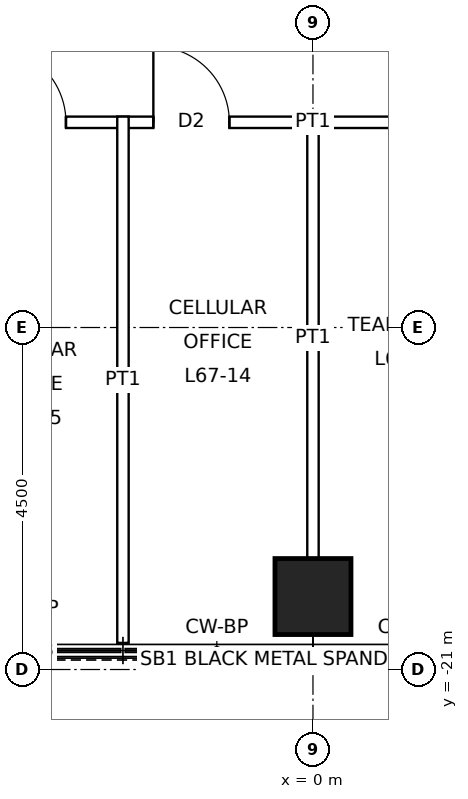
"""IFC4 building model, lengths in metres.
Left out: names, types, materials, properties, quantities, classifications, styles, units other than length and angle.
Written with IfcOpenShell. Run it as: python <this file> out.ifc"""

import sys

from ifc_helpers import new_model, si_unit, direction, frame, frame_2d, origin, origin_2d, place, context, subcontext, project, spatial, rectangle, hollow_rectangle, extrude, element, fill, save


model = new_model("IFC4")
c1 = context("Model", 3, precision=1e-05, world=origin(), true_north=direction((0.0, 1.0)))
c2 = subcontext(c1, "Body", "Model", "MODEL_VIEW")
j1 = project(units=[si_unit("LENGTHUNIT", "METRE"), si_unit("PLANEANGLEUNIT", "RADIAN")], contexts=[c1])
p1 = place(None, origin())
s1 = spatial("IfcSite", under=j1, at=p1, CompositionType="ELEMENT")
p2 = place(p1, origin())
s2 = spatial("IfcBuilding", under=s1, at=p2, CompositionType="ELEMENT")
p3 = place(p2, frame((0.0, 0.0, 303.9)))
s3 = spatial("IfcBuildingStorey", under=s2, at=p3, CompositionType="ELEMENT", Elevation=303.9)
p4 = place(p3, frame((0.0, -20.04, 0.0), z_axis=(0.0, 0.0, 1.0), x_axis=(1.0, 0.0, 0.0)))
e1 = element("IfcColumn", 1, at=p4, inside=s3, PredefinedType="COLUMN", context=c2, shape_type="SweptSolid", body=[
    extrude(hollow_rectangle(XDim=1.0, YDim=1.0, WallThickness=0.075, at=origin_2d()), origin(), (0.0, 0.0, 1.0), 4.0),
])
p5 = place(p3, frame((-13.875, -13.8, 0.0), z_axis=(0.0, 0.0, 1.0), x_axis=(1.0, 0.0, 0.0)))
e2 = element("IfcWall", 2, at=p5, inside=s3, PredefinedType="PARTITIONING", context=c2, shape_type="SweptSolid", body=[
    extrude(rectangle(XDim=27.75, YDim=0.15, at=frame_2d((13.875, 0.0))), origin(), (0.0, 0.0, 1.0), 3.85),
])
p6 = place(p5, frame((21.775, 0.0, 0.0)))
e3 = element("IfcOpeningElement", 3, at=p6, cuts=e2, PredefinedType="OPENING", context=c2, shape_type="SweptSolid", body=[
    extrude(rectangle(XDim=1.0, YDim=2.1, at=frame_2d((0.5, 1.05))), frame((0.0, 0.085, 0.0), z_axis=(0.0, -1.0, 0.0), x_axis=(1.0, 0.0, 0.0)), (0.0, 0.0, 1.0), 0.17),
])
p7 = place(p5, frame((19.625, 0.0, 0.0)))
e4 = element("IfcOpeningElement", 4, at=p7, cuts=e2, PredefinedType="OPENING", context=c2, shape_type="SweptSolid", body=[
    extrude(rectangle(XDim=1.0, YDim=2.1, at=frame_2d((0.5, 1.05))), frame((0.0, 0.085, 0.0), z_axis=(0.0, -1.0, 0.0), x_axis=(1.0, 0.0, 0.0)), (0.0, 0.0, 1.0), 0.17),
])
p8 = place(p5, frame((17.125, 0.0, 0.0)))
e5 = element("IfcOpeningElement", 5, at=p8, cuts=e2, PredefinedType="OPENING", context=c2, shape_type="SweptSolid", body=[
    extrude(rectangle(XDim=1.0, YDim=2.1, at=frame_2d((0.5, 1.05))), frame((0.0, 0.085, 0.0), z_axis=(0.0, -1.0, 0.0), x_axis=(1.0, 0.0, 0.0)), (0.0, 0.0, 1.0), 0.17),
])
p9 = place(p5, frame((14.975, 0.0, 0.0)))
e6 = element("IfcOpeningElement", 6, at=p9, cuts=e2, PredefinedType="OPENING", context=c2, shape_type="SweptSolid", body=[
    extrude(rectangle(XDim=1.0, YDim=2.1, at=frame_2d((0.5, 1.05))), frame((0.0, 0.085, 0.0), z_axis=(0.0, -1.0, 0.0), x_axis=(1.0, 0.0, 0.0)), (0.0, 0.0, 1.0), 0.17),
])
p10 = place(p5, frame((11.775, 0.0, 0.0)))
e7 = element("IfcOpeningElement", 7, at=p10, cuts=e2, PredefinedType="OPENING", context=c2, shape_type="SweptSolid", body=[
    extrude(rectangle(XDim=1.0, YDim=2.1, at=frame_2d((0.5, 1.05))), frame((0.0, 0.085, 0.0), z_axis=(0.0, -1.0, 0.0), x_axis=(1.0, 0.0, 0.0)), (0.0, 0.0, 1.0), 0.17),
])
p11 = place(p5, frame((9.625, 0.0, 0.0)))
e8 = element("IfcOpeningElement", 8, at=p11, cuts=e2, PredefinedType="OPENING", context=c2, shape_type="SweptSolid", body=[
    extrude(rectangle(XDim=1.0, YDim=2.1, at=frame_2d((0.5, 1.05))), frame((0.0, 0.085, 0.0), z_axis=(0.0, -1.0, 0.0), x_axis=(1.0, 0.0, 0.0)), (0.0, 0.0, 1.0), 0.17),
])
p12 = place(p5, frame((7.125, 0.0, 0.0)))
e9 = element("IfcOpeningElement", 9, at=p12, cuts=e2, PredefinedType="OPENING", context=c2, shape_type="SweptSolid", body=[
    extrude(rectangle(XDim=1.0, YDim=2.1, at=frame_2d((0.5, 1.05))), frame((0.0, 0.085, 0.0), z_axis=(0.0, -1.0, 0.0), x_axis=(1.0, 0.0, 0.0)), (0.0, 0.0, 1.0), 0.17),
])
p13 = place(p5, frame((4.438, 0.0, 0.0)))
e10 = element("IfcOpeningElement", 10, at=p13, cuts=e2, PredefinedType="OPENING", context=c2, shape_type="SweptSolid", body=[
    extrude(rectangle(XDim=1.0, YDim=2.1, at=frame_2d((0.5, 1.05))), frame((0.0, 0.085, 0.0), z_axis=(0.0, -1.0, 0.0), x_axis=(1.0, 0.0, 0.0)), (0.0, 0.0, 1.0), 0.17),
])
p14 = place(p5, frame((25.625, 0.0, 0.0)))
e11 = element("IfcOpeningElement", 11, at=p14, cuts=e2, PredefinedType="OPENING", context=c2, shape_type="SweptSolid", body=[
    extrude(rectangle(XDim=1.0, YDim=2.4, at=frame_2d((0.5, 1.2))), frame((0.0, 0.085, 0.0), z_axis=(0.0, -1.0, 0.0), x_axis=(1.0, 0.0, 0.0)), (0.0, 0.0, 1.0), 0.17),
])
p15 = place(p5, frame((1.288, 0.0, 0.0)))
e12 = element("IfcOpeningElement", 12, at=p15, cuts=e2, PredefinedType="OPENING", context=c2, shape_type="SweptSolid", body=[
    extrude(rectangle(XDim=1.0, YDim=2.4, at=frame_2d((0.5, 1.2))), frame((0.0, 0.085, 0.0), z_axis=(0.0, -1.0, 0.0), x_axis=(1.0, 0.0, 0.0)), (0.0, 0.0, 1.0), 0.17),
])
p16 = place(p3, frame((-2.5, -20.65, 0.0), z_axis=(0.0, 0.0, 1.0), x_axis=(0.0, 1.0, 0.0)))
e13 = element("IfcWall", 13, at=p16, inside=s3, PredefinedType="PARTITIONING", context=c2, shape_type="SweptSolid", body=[
    extrude(rectangle(XDim=6.925, YDim=0.15, at=frame_2d((3.462, 0.0))), origin(), (0.0, 0.0, 1.0), 3.85),
])
p17 = place(p3, frame((0.0, -19.54, 0.0), z_axis=(0.0, 0.0, 1.0), x_axis=(0.0, 1.0, 0.0)))
e14 = element("IfcWall", 14, at=p17, inside=s3, PredefinedType="PARTITIONING", context=c2, shape_type="SweptSolid", body=[
    extrude(rectangle(XDim=5.815, YDim=0.15, at=frame_2d((2.907, 0.0))), origin(), (0.0, 0.0, 1.0), 3.243),
])
p18 = place(p10, origin())
e15 = element("IfcDoor", 15, at=p18, inside=s3, OperationType="SINGLE_SWING_LEFT", PredefinedType="DOOR", context=c2, shape_type="SweptSolid", body=[
    extrude(rectangle(XDim=1.0, YDim=2.1, at=frame_2d((0.5, 1.05))), frame((0.0, 0.025, 0.0), z_axis=(0.0, -1.0, 0.0), x_axis=(1.0, 0.0, 0.0)), (0.0, 0.0, 1.0), 0.05),
])
fill(e7, e15)
p19 = place(p11, origin())
e16 = element("IfcDoor", 16, at=p19, inside=s3, OperationType="SINGLE_SWING_LEFT", PredefinedType="DOOR", context=c2, shape_type="SweptSolid", body=[
    extrude(rectangle(XDim=1.0, YDim=2.1, at=frame_2d((0.5, 1.05))), frame((0.0, 0.025, 0.0), z_axis=(0.0, -1.0, 0.0), x_axis=(1.0, 0.0, 0.0)), (0.0, 0.0, 1.0), 0.05),
])
fill(e8, e16)
save(model, sys.argv[1])
